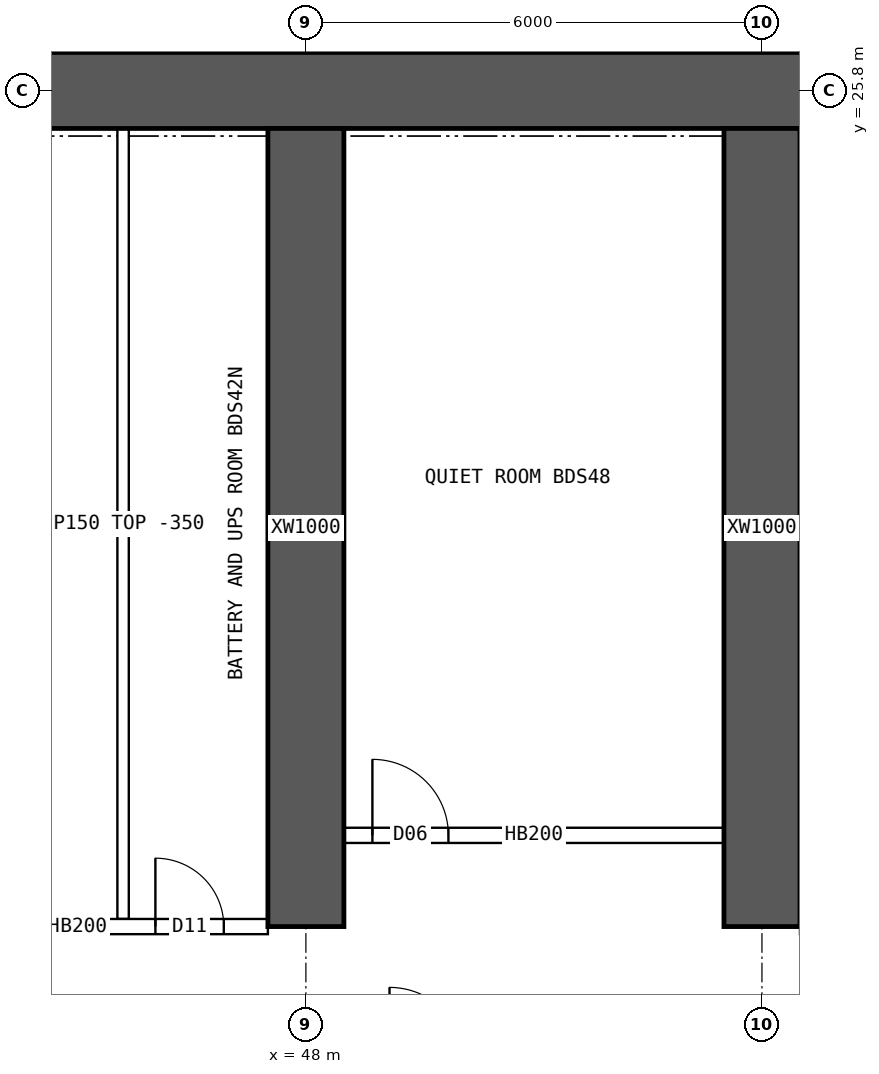
"""IFC4 building model, lengths in metres.
Left out: names, types, materials, properties, quantities, classifications, styles, units other than length and angle.
Written with IfcOpenShell. Run it as: python <this file> out.ifc"""

import sys

from ifc_helpers import new_model, si_unit, direction, frame, frame_2d, origin, place, context, subcontext, project, spatial, rectangle, extrude, element, fill, save


model = new_model("IFC4")
c1 = context("Model", 3, precision=1e-05, world=origin(), true_north=direction((0.0, 1.0)))
c2 = subcontext(c1, "Body", "Model", "MODEL_VIEW")
j1 = project(units=[si_unit("LENGTHUNIT", "METRE"), si_unit("PLANEANGLEUNIT", "RADIAN")], contexts=[c1])
p1 = place(None, origin())
s1 = spatial("IfcSite", under=j1, at=p1, CompositionType="ELEMENT")
p2 = place(p1, origin())
s2 = spatial("IfcBuilding", under=s1, at=p2, CompositionType="ELEMENT")
p3 = place(p2, frame((0.0, 0.0, 65.2)))
s3 = spatial("IfcBuildingStorey", under=s2, at=p3, CompositionType="ELEMENT", Elevation=65.2)
p4 = place(p3, frame((18.0, 25.8, 0.0), z_axis=(0.0, 0.0, 1.0), x_axis=(1.0, 0.0, 0.0)))
e1 = element("IfcWall", 1, at=p4, inside=s3, PredefinedType="SHEAR", context=c2, shape_type="SweptSolid", body=[
    extrude(rectangle(XDim=48.0, YDim=1.0, at=frame_2d((24.0, 0.0))), origin(), (0.0, 0.0, 1.0), 3.75),
])
for number, where, z_axis, x_axis in (
    (2, (48.0, 14.8, 0.0), (0.0, 0.0, 1.0), (0.0, 1.0, 0.0)),
    (3, (54.0, 14.8, 0.0), (0.0, 0.0, 1.0), (0.0, 1.0, 0.0)),
):
    element("IfcWall", number, at=place(p3, frame(where, z_axis=z_axis, x_axis=x_axis)), inside=s3, PredefinedType="SHEAR", context=c2, shape_type="SweptSolid", body=[
        extrude(rectangle(XDim=10.5, YDim=1.0, at=frame_2d((5.25, 0.0))), origin(), (0.0, 0.0, 1.0), 3.75),
    ])
p5 = place(p3, frame((42.5, 14.8, 0.0), z_axis=(0.0, 0.0, 1.0), x_axis=(1.0, 0.0, 0.0)))
e4 = element("IfcWall", 4, at=p5, inside=s3, PredefinedType="SOLIDWALL", context=c2, shape_type="SweptSolid", body=[
    extrude(rectangle(XDim=5.0, YDim=0.2, at=frame_2d((2.5, 0.0))), origin(), (0.0, 0.0, 1.0), 3.4),
])
p6 = place(p5, frame((0.35, 0.0, 0.0)))
e5 = element("IfcOpeningElement", 5, at=p6, cuts=e4, PredefinedType="OPENING", context=c2, shape_type="SweptSolid", body=[
    extrude(rectangle(XDim=0.9, YDim=2.1, at=frame_2d((0.45, 1.05))), frame((0.0, 0.11, 0.0), z_axis=(0.0, -1.0, 0.0), x_axis=(1.0, 0.0, 0.0)), (0.0, 0.0, 1.0), 0.22),
])
p7 = place(p5, frame((3.52, 0.0, 0.0)))
e6 = element("IfcOpeningElement", 6, at=p7, cuts=e4, PredefinedType="OPENING", context=c2, shape_type="SweptSolid", body=[
    extrude(rectangle(XDim=0.9, YDim=2.1, at=frame_2d((0.45, 1.05))), frame((0.0, 0.11, 0.0), z_axis=(0.0, -1.0, 0.0), x_axis=(1.0, 0.0, 0.0)), (0.0, 0.0, 1.0), 0.22),
])
p8 = place(p3, frame((45.595, 14.9, 0.0), z_axis=(0.0, 0.0, 1.0), x_axis=(0.0, 1.0, 0.0)))
e7 = element("IfcWall", 7, at=p8, inside=s3, PredefinedType="PARTITIONING", context=c2, shape_type="SweptSolid", body=[
    extrude(rectangle(XDim=10.4, YDim=0.15, at=frame_2d((5.2, 0.0))), origin(), (0.0, 0.0, 1.0), 3.4),
])
p9 = place(p3, frame((48.5, 16.0, 0.0), z_axis=(0.0, 0.0, 1.0), x_axis=(1.0, 0.0, 0.0)))
e8 = element("IfcWall", 8, at=p9, inside=s3, PredefinedType="SOLIDWALL", context=c2, shape_type="SweptSolid", body=[
    extrude(rectangle(XDim=5.0, YDim=0.2, at=frame_2d((2.5, 0.0))), origin(), (0.0, 0.0, 1.0), 3.4),
])
p10 = place(p9, frame((0.375, 0.0, 0.0)))
e9 = element("IfcOpeningElement", 9, at=p10, cuts=e8, PredefinedType="OPENING", context=c2, shape_type="SweptSolid", body=[
    extrude(rectangle(XDim=1.0, YDim=2.1, at=frame_2d((0.5, 1.05))), frame((0.0, 0.11, 0.0), z_axis=(0.0, -1.0, 0.0), x_axis=(1.0, 0.0, 0.0)), (0.0, 0.0, 1.0), 0.22),
])
p11 = place(p7, origin())
e10 = element("IfcDoor", 10, at=p11, inside=s3, OperationType="SINGLE_SWING_LEFT", PredefinedType="DOOR", context=c2, shape_type="SweptSolid", body=[
    extrude(rectangle(XDim=0.9, YDim=2.1, at=frame_2d((0.45, 1.05))), frame((0.0, 0.025, 0.0), z_axis=(0.0, -1.0, 0.0), x_axis=(1.0, 0.0, 0.0)), (0.0, 0.0, 1.0), 0.05),
])
fill(e6, e10)
p12 = place(p10, origin())
e11 = element("IfcDoor", 11, at=p12, inside=s3, OperationType="SINGLE_SWING_LEFT", PredefinedType="DOOR", context=c2, shape_type="SweptSolid", body=[
    extrude(rectangle(XDim=1.0, YDim=2.1, at=frame_2d((0.5, 1.05))), frame((0.0, 0.025, 0.0), z_axis=(0.0, -1.0, 0.0), x_axis=(1.0, 0.0, 0.0)), (0.0, 0.0, 1.0), 0.05),
])
fill(e9, e11)
save(model, sys.argv[1])
